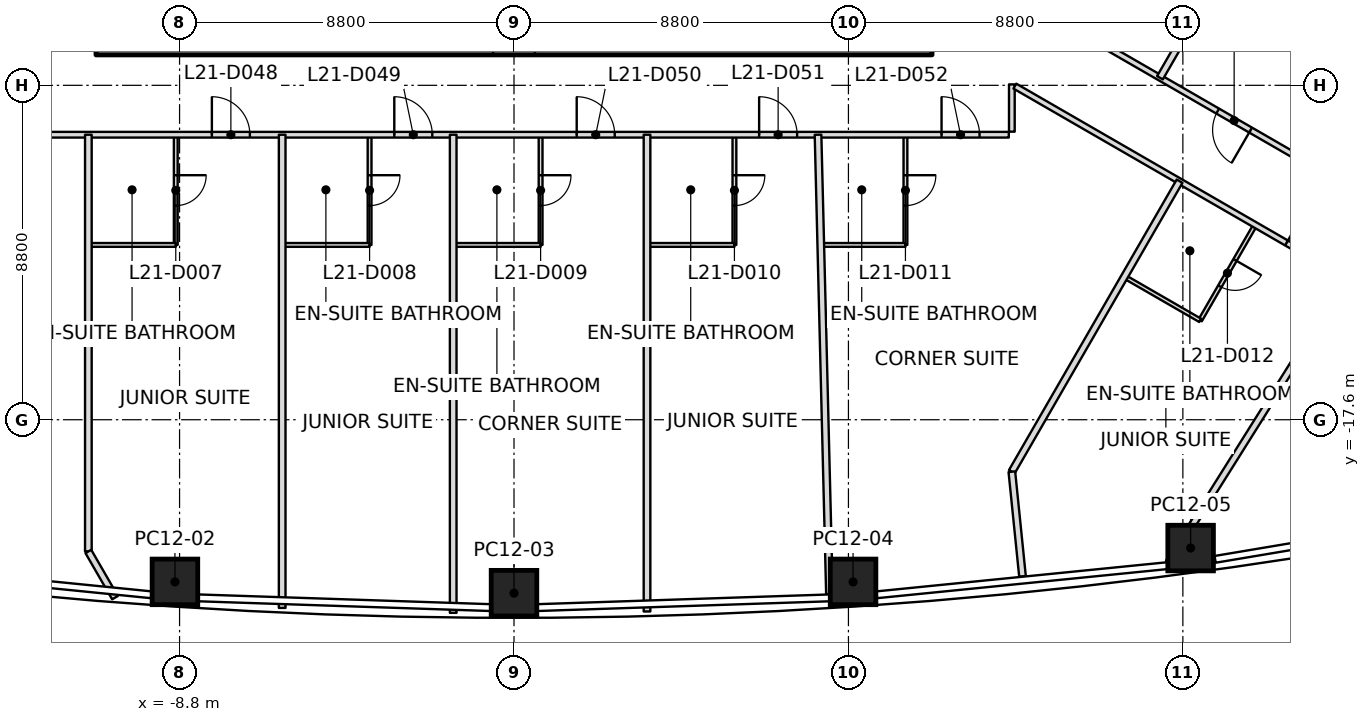
"""IFC4 building model, lengths in metres.
Left out: names, types, materials, properties, quantities, classifications, styles, units other than length and angle.
Written with IfcOpenShell. Run it as: python <this file> out.ifc"""

import sys

from ifc_helpers import new_model, si_unit, direction, frame, frame_2d, origin, origin_2d, place, context, subcontext, project, spatial, rectangle, extrude, element, fill, save


model = new_model("IFC4")
c1 = context("Model", 3, precision=1e-05, world=origin(), true_north=direction((0.0, 1.0)))
c2 = subcontext(c1, "Body", "Model", "MODEL_VIEW")
j1 = project(units=[si_unit("LENGTHUNIT", "METRE"), si_unit("PLANEANGLEUNIT", "RADIAN")], contexts=[c1])
p1 = place(None, origin())
s1 = spatial("IfcSite", under=j1, at=p1, CompositionType="ELEMENT")
p2 = place(p1, origin())
s2 = spatial("IfcBuilding", under=s1, at=p2, CompositionType="ELEMENT")
p3 = place(p2, frame((0.0, 0.0, 99.8)))
s3 = spatial("IfcBuildingStorey", under=s2, at=p3, CompositionType="ELEMENT", Elevation=99.8)
p4 = place(p3, frame((-8.922, -21.867, 0.0), z_axis=(0.009632635025, 0.012073782257, 0.999880710947), x_axis=(-0.997737791534, 0.066646321699, 0.008807221425)))
e1 = element("IfcColumn", 1, at=p4, inside=s3, PredefinedType="COLUMN", context=c2, shape_type="SweptSolid", body=[
    extrude(rectangle(XDim=1.2, YDim=1.2, at=origin_2d()), origin(), (0.0, 0.0, 1.0), 3.7),
])
p5 = place(p3, frame((0.0, -22.164, 0.0), z_axis=(0.0, 0.012338222751, 0.999923881233), x_axis=(1.0, 0.0, 0.0)))
e2 = element("IfcColumn", 2, at=p5, inside=s3, PredefinedType="COLUMN", context=c2, shape_type="SweptSolid", body=[
    extrude(rectangle(XDim=1.2, YDim=1.2, at=origin_2d()), origin(), (0.0, 0.0, 1.0), 3.7),
])
p6 = place(p3, frame((8.922, -21.867, 0.0), z_axis=(-0.009632635025, 0.012073782257, 0.999880710947), x_axis=(0.997737791534, 0.066646321699, 0.008807221425)))
e3 = element("IfcColumn", 3, at=p6, inside=s3, PredefinedType="COLUMN", context=c2, shape_type="SweptSolid", body=[
    extrude(rectangle(XDim=1.2, YDim=1.2, at=origin_2d()), origin(), (0.0, 0.0, 1.0), 3.7),
])
p7 = place(p3, frame((17.804, -20.977, 0.0), z_axis=(-0.019196808933, 0.011346567479, 0.99975133805), x_axis=(0.99096351093, 0.132982750018, 0.01751879569)))
e4 = element("IfcColumn", 4, at=p7, inside=s3, PredefinedType="COLUMN", context=c2, shape_type="SweptSolid", body=[
    extrude(rectangle(XDim=1.2, YDim=1.2, at=origin_2d()), origin(), (0.0, 0.0, 1.0), 3.701),
])
p8 = place(p3, frame((-11.0, -7.75, 0.0), z_axis=(0.0, 0.0, 1.0), x_axis=(1.0, 0.0, 0.0)))
e5 = element("IfcWall", 5, at=p8, inside=s3, PredefinedType="SHEAR", context=c2, shape_type="SweptSolid", body=[
    extrude(rectangle(XDim=22.0, YDim=0.5, at=frame_2d((11.0, 0.0))), origin(), (0.0, 0.0, 1.0), 3.7),
])
p9 = place(p8, frame((10.45, 0.0, 0.0)))
e6 = element("IfcOpeningElement", 6, at=p9, cuts=e5, PredefinedType="OPENING", context=c2, shape_type="SweptSolid", body=[
    extrude(rectangle(XDim=1.1, YDim=2.1, at=frame_2d((0.55, 1.05))), frame((0.0, 0.25, 0.0), z_axis=(0.0, -1.0, 0.0), x_axis=(1.0, 0.0, 0.0)), (0.0, 0.0, 1.0), 0.5),
])
p10 = place(p3, frame((-11.2, -10.1, 0.0), z_axis=(0.0, 0.0, 1.0), x_axis=(0.0, -1.0, 0.0)))
e7 = element("IfcWall", 7, at=p10, inside=s3, PredefinedType="PARTITIONING", context=c2, shape_type="SweptSolid", body=[
    extrude(rectangle(XDim=10.967, YDim=0.175, at=frame_2d((5.483, 0.0))), origin(), (0.0, 0.0, 1.0), 3.0),
])
p11 = place(p3, frame((-11.2, -21.067, 0.0), z_axis=(0.0, 0.0, 1.0), x_axis=(0.500068863623, -0.865985641702, 0.0)))
e8 = element("IfcWall", 8, at=p11, inside=s3, PredefinedType="PARTITIONING", context=c2, shape_type="SweptSolid", body=[
    extrude(rectangle(XDim=1.403, YDim=0.175, at=frame_2d((0.702, 0.0))), origin(), (0.0, 0.0, 1.0), 2.934),
])
p12 = place(p3, frame((-6.1, -10.1, 0.0), z_axis=(0.0, 0.0, 1.0), x_axis=(0.0, -1.0, 0.0)))
e9 = element("IfcWall", 9, at=p12, inside=s3, PredefinedType="PARTITIONING", context=c2, shape_type="SweptSolid", body=[
    extrude(rectangle(XDim=12.452, YDim=0.175, at=frame_2d((6.226, 0.0))), origin(), (0.0, 0.0, 1.0), 2.784),
])
p13 = place(p3, frame((-1.6, -10.1, 0.0), z_axis=(0.0, 0.0, 1.0), x_axis=(0.0, -1.0, 0.0)))
e10 = element("IfcWall", 10, at=p13, inside=s3, PredefinedType="PARTITIONING", context=c2, shape_type="SweptSolid", body=[
    extrude(rectangle(XDim=12.582, YDim=0.175, at=frame_2d((6.291, 0.0))), origin(), (0.0, 0.0, 1.0), 2.784),
])
p14 = place(p3, frame((3.5, -10.1, 0.0), z_axis=(0.0, 0.0, 1.0), x_axis=(0.0, -1.0, 0.0)))
e11 = element("IfcWall", 11, at=p14, inside=s3, PredefinedType="PARTITIONING", context=c2, shape_type="SweptSolid", body=[
    extrude(rectangle(XDim=12.546, YDim=0.175, at=frame_2d((6.273, 0.0))), origin(), (0.0, 0.0, 1.0), 2.784),
])
p15 = place(p3, frame((8.0, -10.1, 0.0), z_axis=(0.0, 0.0, 1.0), x_axis=(0.024895837943, -0.999690050592, 0.0)))
e12 = element("IfcWall", 12, at=p15, inside=s3, PredefinedType="PARTITIONING", context=c2, shape_type="SweptSolid", body=[
    extrude(rectangle(XDim=12.091, YDim=0.175, at=frame_2d((6.046, 0.0))), origin(), (0.0, 0.0, 1.0), 2.784),
])
p16 = place(p3, frame((17.513, -11.324, 0.0), z_axis=(0.0, 0.0, 1.0), x_axis=(-0.499982637805, -0.86603542762, 0.0)))
e13 = element("IfcWall", 13, at=p16, inside=s3, PredefinedType="PARTITIONING", context=c2, shape_type="SweptSolid", body=[
    extrude(rectangle(XDim=8.826, YDim=0.175, at=frame_2d((4.413, 0.0))), origin(), (0.0, 0.0, 1.0), 2.797),
])
p17 = place(p3, frame((13.1, -18.968, 0.0), z_axis=(0.0, 0.0, 1.0), x_axis=(0.101232273985, -0.994862818033, 0.0)))
e14 = element("IfcWall", 14, at=p17, inside=s3, PredefinedType="PARTITIONING", context=c2, shape_type="SweptSolid", body=[
    extrude(rectangle(XDim=2.769, YDim=0.175, at=frame_2d((1.384, 0.0))), origin(), (0.0, 0.0, 1.0), 2.784),
])
p18 = place(p3, frame((16.997, -8.601, 0.0), z_axis=(0.0, 0.0, 1.0), x_axis=(0.500004790049, 0.866022638231, 0.0)))
e15 = element("IfcWall", 15, at=p18, inside=s3, PredefinedType="PARTITIONING", context=c2, shape_type="SweptSolid", body=[
    extrude(rectangle(XDim=13.823, YDim=0.175, at=frame_2d((6.911, 0.0))), origin(), (0.0, 0.0, 1.0), 2.784),
])
p19 = place(p3, frame((21.93, -13.874, 0.0), z_axis=(0.0, 0.0, 1.0), x_axis=(-0.53194005048, -0.846782016044, 0.0)))
e16 = element("IfcWall", 16, at=p19, inside=s3, PredefinedType="PARTITIONING", context=c2, shape_type="SweptSolid", body=[
    extrude(rectangle(XDim=8.834, YDim=0.175, at=frame_2d((4.417, 0.0))), origin(), (0.0, 0.0, 1.0), 3.0),
])
p20 = place(p3, frame((-13.02, -10.1, 0.0), z_axis=(0.0, 0.0, 1.0), x_axis=(1.0, 0.0, 0.0)))
e17 = element("IfcWall", 17, at=p20, inside=s3, PredefinedType="PARTITIONING", context=c2, shape_type="SweptSolid", body=[
    extrude(rectangle(XDim=26.04, YDim=0.15, at=frame_2d((13.02, 0.0))), origin(), (0.0, 0.0, 1.0), 2.867),
])
p21 = place(p20, frame((5.07, 0.0, 0.0)))
e18 = element("IfcOpeningElement", 18, at=p21, cuts=e17, PredefinedType="OPENING", context=c2, shape_type="SweptSolid", body=[
    extrude(rectangle(XDim=1.0, YDim=2.1, at=frame_2d((0.5, 1.05))), frame((0.0, 0.075, 0.0), z_axis=(0.0, -1.0, 0.0), x_axis=(1.0, 0.0, 0.0)), (0.0, 0.0, 1.0), 0.15),
])
p22 = place(p20, frame((9.87, 0.0, 0.0)))
e19 = element("IfcOpeningElement", 19, at=p22, cuts=e17, PredefinedType="OPENING", context=c2, shape_type="SweptSolid", body=[
    extrude(rectangle(XDim=1.0, YDim=2.1, at=frame_2d((0.5, 1.05))), frame((0.0, 0.075, 0.0), z_axis=(0.0, -1.0, 0.0), x_axis=(1.0, 0.0, 0.0)), (0.0, 0.0, 1.0), 0.15),
])
p23 = place(p20, frame((14.67, 0.0, 0.0)))
e20 = element("IfcOpeningElement", 20, at=p23, cuts=e17, PredefinedType="OPENING", context=c2, shape_type="SweptSolid", body=[
    extrude(rectangle(XDim=1.0, YDim=2.1, at=frame_2d((0.5, 1.05))), frame((0.0, 0.075, 0.0), z_axis=(0.0, -1.0, 0.0), x_axis=(1.0, 0.0, 0.0)), (0.0, 0.0, 1.0), 0.15),
])
p24 = place(p20, frame((19.47, 0.0, 0.0)))
e21 = element("IfcOpeningElement", 21, at=p24, cuts=e17, PredefinedType="OPENING", context=c2, shape_type="SweptSolid", body=[
    extrude(rectangle(XDim=1.0, YDim=2.1, at=frame_2d((0.5, 1.05))), frame((0.0, 0.075, 0.0), z_axis=(0.0, -1.0, 0.0), x_axis=(1.0, 0.0, 0.0)), (0.0, 0.0, 1.0), 0.15),
])
p25 = place(p20, frame((24.27, 0.0, 0.0)))
e22 = element("IfcOpeningElement", 22, at=p25, cuts=e17, PredefinedType="OPENING", context=c2, shape_type="SweptSolid", body=[
    extrude(rectangle(XDim=1.0, YDim=2.1, at=frame_2d((0.5, 1.05))), frame((0.0, 0.075, 0.0), z_axis=(0.0, -1.0, 0.0), x_axis=(1.0, 0.0, 0.0)), (0.0, 0.0, 1.0), 0.15),
])
p26 = place(p3, frame((13.1, -10.02, 0.0), z_axis=(0.0, 0.0, 1.0), x_axis=(0.0, 1.0, 0.0)))
e23 = element("IfcWall", 23, at=p26, inside=s3, PredefinedType="PARTITIONING", context=c2, shape_type="SweptSolid", body=[
    extrude(rectangle(XDim=1.244, YDim=0.15, at=frame_2d((0.622, 0.0))), origin(), (0.0, 0.0, 1.0), 2.797),
])
p27 = place(p3, frame((13.179, -8.822, 0.0), z_axis=(0.0, 0.0, 1.0), x_axis=(0.866025385035, -0.500000032475, 0.0)))
e24 = element("IfcWall", 24, at=p27, inside=s3, PredefinedType="PARTITIONING", context=c2, shape_type="SweptSolid", body=[
    extrude(rectangle(XDim=10.024, YDim=0.15, at=frame_2d((5.012, 0.0))), origin(), (0.0, 0.0, 1.0), 2.797),
])
p28 = place(p27, frame((8.254, 0.0, 0.0)))
e25 = element("IfcOpeningElement", 25, at=p28, cuts=e24, PredefinedType="OPENING", context=c2, shape_type="SweptSolid", body=[
    extrude(rectangle(XDim=1.0, YDim=2.1, at=frame_2d((0.5, 1.05))), frame((0.0, 0.075, 0.0), z_axis=(0.0, -1.0, 0.0), x_axis=(1.0, 0.0, 0.0)), (0.0, 0.0, 1.0), 0.15),
])
p29 = place(p3, frame((22.911, -12.015, 0.0), z_axis=(0.0, 0.0, 1.0), x_axis=(-0.866018341403, 0.500012232204, 0.0)))
e26 = element("IfcWall", 26, at=p29, inside=s3, PredefinedType="PARTITIONING", context=c2, shape_type="SweptSolid", body=[
    extrude(rectangle(XDim=11.328, YDim=0.15, at=frame_2d((5.664, 0.0))), origin(), (0.0, 0.0, 1.0), 2.797),
])
p30 = place(p29, frame((4.074, 0.0, 0.0)))
e27 = element("IfcOpeningElement", 27, at=p30, cuts=e26, PredefinedType="OPENING", context=c2, shape_type="SweptSolid", body=[
    extrude(rectangle(XDim=1.0, YDim=2.1, at=frame_2d((0.5, 1.05))), frame((0.0, 0.075, 0.0), z_axis=(0.0, -1.0, 0.0), x_axis=(1.0, 0.0, 0.0)), (0.0, 0.0, 1.0), 0.15),
])
p31 = place(p3, frame((-8.9, -10.13, 0.0), z_axis=(0.0, 0.0, 1.0), x_axis=(0.0, -1.0, 0.0)))
e28 = element("IfcWall", 28, at=p31, inside=s3, PredefinedType="PARTITIONING", context=c2, shape_type="SweptSolid", body=[
    extrude(rectangle(XDim=2.87, YDim=0.1, at=frame_2d((1.435, 0.0))), origin(), (0.0, 0.0, 1.0), 3.0),
])
p32 = place(p31, frame((1.035, 0.0, 0.0)))
e29 = element("IfcOpeningElement", 29, at=p32, cuts=e28, PredefinedType="OPENING", context=c2, shape_type="SweptSolid", body=[
    extrude(rectangle(XDim=0.8, YDim=2.1, at=frame_2d((0.4, 1.05))), frame((0.0, 0.05, 0.0), z_axis=(0.0, -1.0, 0.0), x_axis=(1.0, 0.0, 0.0)), (0.0, 0.0, 1.0), 0.1),
])
p33 = place(p3, frame((-8.9, -13.0, 0.0), z_axis=(0.0, 0.0, 1.0), x_axis=(-1.0, 0.0, 0.0)))
e30 = element("IfcWall", 30, at=p33, inside=s3, PredefinedType="PARTITIONING", context=c2, shape_type="SweptSolid", body=[
    extrude(rectangle(XDim=2.27, YDim=0.1, at=frame_2d((1.135, 0.0))), origin(), (0.0, 0.0, 1.0), 3.0),
])
p34 = place(p3, frame((-3.8, -10.13, 0.0), z_axis=(0.0, 0.0, 1.0), x_axis=(0.0, -1.0, 0.0)))
e31 = element("IfcWall", 31, at=p34, inside=s3, PredefinedType="PARTITIONING", context=c2, shape_type="SweptSolid", body=[
    extrude(rectangle(XDim=2.87, YDim=0.1, at=frame_2d((1.435, 0.0))), origin(), (0.0, 0.0, 1.0), 3.0),
])
p35 = place(p34, frame((1.035, 0.0, 0.0)))
e32 = element("IfcOpeningElement", 32, at=p35, cuts=e31, PredefinedType="OPENING", context=c2, shape_type="SweptSolid", body=[
    extrude(rectangle(XDim=0.8, YDim=2.1, at=frame_2d((0.4, 1.05))), frame((0.0, 0.05, 0.0), z_axis=(0.0, -1.0, 0.0), x_axis=(1.0, 0.0, 0.0)), (0.0, 0.0, 1.0), 0.1),
])
p36 = place(p3, frame((-3.8, -13.0, 0.0), z_axis=(0.0, 0.0, 1.0), x_axis=(-1.0, 0.0, 0.0)))
e33 = element("IfcWall", 33, at=p36, inside=s3, PredefinedType="PARTITIONING", context=c2, shape_type="SweptSolid", body=[
    extrude(rectangle(XDim=2.27, YDim=0.1, at=frame_2d((1.135, 0.0))), origin(), (0.0, 0.0, 1.0), 3.0),
])
p37 = place(p3, frame((0.7, -10.13, 0.0), z_axis=(0.0, 0.0, 1.0), x_axis=(0.0, -1.0, 0.0)))
e34 = element("IfcWall", 34, at=p37, inside=s3, PredefinedType="PARTITIONING", context=c2, shape_type="SweptSolid", body=[
    extrude(rectangle(XDim=2.87, YDim=0.1, at=frame_2d((1.435, 0.0))), origin(), (0.0, 0.0, 1.0), 3.0),
])
p38 = place(p37, frame((1.035, 0.0, 0.0)))
e35 = element("IfcOpeningElement", 35, at=p38, cuts=e34, PredefinedType="OPENING", context=c2, shape_type="SweptSolid", body=[
    extrude(rectangle(XDim=0.8, YDim=2.1, at=frame_2d((0.4, 1.05))), frame((0.0, 0.05, 0.0), z_axis=(0.0, -1.0, 0.0), x_axis=(1.0, 0.0, 0.0)), (0.0, 0.0, 1.0), 0.1),
])
p39 = place(p3, frame((0.7, -13.0, 0.0), z_axis=(0.0, 0.0, 1.0), x_axis=(-1.0, 0.0, 0.0)))
e36 = element("IfcWall", 36, at=p39, inside=s3, PredefinedType="PARTITIONING", context=c2, shape_type="SweptSolid", body=[
    extrude(rectangle(XDim=2.27, YDim=0.1, at=frame_2d((1.135, 0.0))), origin(), (0.0, 0.0, 1.0), 2.867),
])
p40 = place(p3, frame((5.8, -10.13, 0.0), z_axis=(0.0, 0.0, 1.0), x_axis=(0.0, -1.0, 0.0)))
e37 = element("IfcWall", 37, at=p40, inside=s3, PredefinedType="PARTITIONING", context=c2, shape_type="SweptSolid", body=[
    extrude(rectangle(XDim=2.87, YDim=0.1, at=frame_2d((1.435, 0.0))), origin(), (0.0, 0.0, 1.0), 3.0),
])
p41 = place(p40, frame((1.035, 0.0, 0.0)))
e38 = element("IfcOpeningElement", 38, at=p41, cuts=e37, PredefinedType="OPENING", context=c2, shape_type="SweptSolid", body=[
    extrude(rectangle(XDim=0.8, YDim=2.1, at=frame_2d((0.4, 1.05))), frame((0.0, 0.05, 0.0), z_axis=(0.0, -1.0, 0.0), x_axis=(1.0, 0.0, 0.0)), (0.0, 0.0, 1.0), 0.1),
])
p42 = place(p3, frame((5.8, -13.0, 0.0), z_axis=(0.0, 0.0, 1.0), x_axis=(-1.0, 0.0, 0.0)))
e39 = element("IfcWall", 39, at=p42, inside=s3, PredefinedType="PARTITIONING", context=c2, shape_type="SweptSolid", body=[
    extrude(rectangle(XDim=2.27, YDim=0.1, at=frame_2d((1.135, 0.0))), origin(), (0.0, 0.0, 1.0), 2.867),
])
p43 = place(p3, frame((10.3, -10.13, 0.0), z_axis=(0.0, 0.0, 1.0), x_axis=(0.0, -1.0, 0.0)))
e40 = element("IfcWall", 40, at=p43, inside=s3, PredefinedType="PARTITIONING", context=c2, shape_type="SweptSolid", body=[
    extrude(rectangle(XDim=2.87, YDim=0.1, at=frame_2d((1.435, 0.0))), origin(), (0.0, 0.0, 1.0), 3.0),
])
p44 = place(p43, frame((1.035, 0.0, 0.0)))
e41 = element("IfcOpeningElement", 41, at=p44, cuts=e40, PredefinedType="OPENING", context=c2, shape_type="SweptSolid", body=[
    extrude(rectangle(XDim=0.8, YDim=2.1, at=frame_2d((0.4, 1.05))), frame((0.0, 0.05, 0.0), z_axis=(0.0, -1.0, 0.0), x_axis=(1.0, 0.0, 0.0)), (0.0, 0.0, 1.0), 0.1),
])
p45 = place(p3, frame((10.3, -13.0, 0.0), z_axis=(0.0, 0.0, 1.0), x_axis=(-1.0, 0.0, 0.0)))
e42 = element("IfcWall", 42, at=p45, inside=s3, PredefinedType="PARTITIONING", context=c2, shape_type="SweptSolid", body=[
    extrude(rectangle(XDim=2.27, YDim=0.1, at=frame_2d((1.135, 0.0))), origin(), (0.0, 0.0, 1.0), 3.0),
])
p46 = place(p3, frame((19.49, -12.5, 0.0), z_axis=(0.0, 0.0, 1.0), x_axis=(-0.499972835562, -0.866041086612, 0.0)))
e43 = element("IfcWall", 43, at=p46, inside=s3, PredefinedType="PARTITIONING", context=c2, shape_type="SweptSolid", body=[
    extrude(rectangle(XDim=2.87, YDim=0.1, at=frame_2d((1.435, 0.0))), origin(), (0.0, 0.0, 1.0), 3.0),
])
p47 = place(p46, frame((1.035, 0.0, 0.0)))
e44 = element("IfcOpeningElement", 44, at=p47, cuts=e43, PredefinedType="OPENING", context=c2, shape_type="SweptSolid", body=[
    extrude(rectangle(XDim=0.8, YDim=2.1, at=frame_2d((0.4, 1.05))), frame((0.0, 0.05, 0.0), z_axis=(0.0, -1.0, 0.0), x_axis=(1.0, 0.0, 0.0)), (0.0, 0.0, 1.0), 0.1),
])
p48 = place(p3, frame((18.055, -14.985, 0.0), z_axis=(0.0, 0.0, 1.0), x_axis=(-0.866044110172, 0.499967598186, 0.0)))
e45 = element("IfcWall", 45, at=p48, inside=s3, PredefinedType="PARTITIONING", context=c2, shape_type="SweptSolid", body=[
    extrude(rectangle(XDim=2.27, YDim=0.1, at=frame_2d((1.135, 0.0))), origin(), (0.0, 0.0, 1.0), 3.0),
])
p49 = place(p21, origin())
e46 = element("IfcDoor", 46, at=p49, inside=s3, OperationType="SINGLE_SWING_LEFT", PredefinedType="DOOR", context=c2, shape_type="SweptSolid", body=[
    extrude(rectangle(XDim=1.0, YDim=2.1, at=frame_2d((0.5, 1.05))), frame((0.0, 0.025, 0.0), z_axis=(0.0, -1.0, 0.0), x_axis=(1.0, 0.0, 0.0)), (0.0, 0.0, 1.0), 0.05),
])
fill(e18, e46)
p50 = place(p32, origin())
e47 = element("IfcDoor", 47, at=p50, inside=s3, OperationType="SINGLE_SWING_RIGHT", PredefinedType="DOOR", context=c2, shape_type="SweptSolid", body=[
    extrude(rectangle(XDim=0.8, YDim=2.1, at=frame_2d((0.4, 1.05))), frame((0.0, 0.025, 0.0), z_axis=(0.0, -1.0, 0.0), x_axis=(1.0, 0.0, 0.0)), (0.0, 0.0, 1.0), 0.05),
])
fill(e29, e47)
p51 = place(p22, origin())
e48 = element("IfcDoor", 48, at=p51, inside=s3, OperationType="SINGLE_SWING_LEFT", PredefinedType="DOOR", context=c2, shape_type="SweptSolid", body=[
    extrude(rectangle(XDim=1.0, YDim=2.1, at=frame_2d((0.5, 1.05))), frame((0.0, 0.025, 0.0), z_axis=(0.0, -1.0, 0.0), x_axis=(1.0, 0.0, 0.0)), (0.0, 0.0, 1.0), 0.05),
])
fill(e19, e48)
p52 = place(p35, origin())
e49 = element("IfcDoor", 49, at=p52, inside=s3, OperationType="SINGLE_SWING_LEFT", PredefinedType="DOOR", context=c2, shape_type="SweptSolid", body=[
    extrude(rectangle(XDim=0.8, YDim=2.1, at=frame_2d((0.4, 1.05))), frame((0.0, 0.025, 0.0), z_axis=(0.0, -1.0, 0.0), x_axis=(1.0, 0.0, 0.0)), (0.0, 0.0, 1.0), 0.05),
])
fill(e32, e49)
p53 = place(p23, origin())
e50 = element("IfcDoor", 50, at=p53, inside=s3, OperationType="SINGLE_SWING_LEFT", PredefinedType="DOOR", context=c2, shape_type="SweptSolid", body=[
    extrude(rectangle(XDim=1.0, YDim=2.1, at=frame_2d((0.5, 1.05))), frame((0.0, 0.025, 0.0), z_axis=(0.0, -1.0, 0.0), x_axis=(1.0, 0.0, 0.0)), (0.0, 0.0, 1.0), 0.05),
])
fill(e20, e50)
p54 = place(p38, origin())
e51 = element("IfcDoor", 51, at=p54, inside=s3, OperationType="SINGLE_SWING_LEFT", PredefinedType="DOOR", context=c2, shape_type="SweptSolid", body=[
    extrude(rectangle(XDim=0.8, YDim=2.1, at=frame_2d((0.4, 1.05))), frame((0.0, 0.025, 0.0), z_axis=(0.0, -1.0, 0.0), x_axis=(1.0, 0.0, 0.0)), (0.0, 0.0, 1.0), 0.05),
])
fill(e35, e51)
p55 = place(p24, origin())
e52 = element("IfcDoor", 52, at=p55, inside=s3, OperationType="SINGLE_SWING_LEFT", PredefinedType="DOOR", context=c2, shape_type="SweptSolid", body=[
    extrude(rectangle(XDim=1.0, YDim=2.1, at=frame_2d((0.5, 1.05))), frame((0.0, 0.025, 0.0), z_axis=(0.0, -1.0, 0.0), x_axis=(1.0, 0.0, 0.0)), (0.0, 0.0, 1.0), 0.05),
])
fill(e21, e52)
p56 = place(p41, origin())
e53 = element("IfcDoor", 53, at=p56, inside=s3, OperationType="SINGLE_SWING_LEFT", PredefinedType="DOOR", context=c2, shape_type="SweptSolid", body=[
    extrude(rectangle(XDim=0.8, YDim=2.1, at=frame_2d((0.4, 1.05))), frame((0.0, 0.025, 0.0), z_axis=(0.0, -1.0, 0.0), x_axis=(1.0, 0.0, 0.0)), (0.0, 0.0, 1.0), 0.05),
])
fill(e38, e53)
p57 = place(p25, origin())
e54 = element("IfcDoor", 54, at=p57, inside=s3, OperationType="SINGLE_SWING_RIGHT", PredefinedType="DOOR", context=c2, shape_type="SweptSolid", body=[
    extrude(rectangle(XDim=1.0, YDim=2.1, at=frame_2d((0.5, 1.05))), frame((0.0, 0.025, 0.0), z_axis=(0.0, -1.0, 0.0), x_axis=(1.0, 0.0, 0.0)), (0.0, 0.0, 1.0), 0.05),
])
fill(e22, e54)
p58 = place(p44, origin())
e55 = element("IfcDoor", 55, at=p58, inside=s3, OperationType="SINGLE_SWING_RIGHT", PredefinedType="DOOR", context=c2, shape_type="SweptSolid", body=[
    extrude(rectangle(XDim=0.8, YDim=2.1, at=frame_2d((0.4, 1.05))), frame((0.0, 0.025, 0.0), z_axis=(0.0, -1.0, 0.0), x_axis=(1.0, 0.0, 0.0)), (0.0, 0.0, 1.0), 0.05),
])
fill(e41, e55)
p59 = place(p28, origin())
e56 = element("IfcDoor", 56, at=p59, inside=s3, OperationType="SINGLE_SWING_LEFT", PredefinedType="DOOR", context=c2, shape_type="SweptSolid", body=[
    extrude(rectangle(XDim=1.0, YDim=2.1, at=frame_2d((0.5, 1.05))), frame((0.0, 0.025, 0.0), z_axis=(0.0, -1.0, 0.0), x_axis=(1.0, 0.0, 0.0)), (0.0, 0.0, 1.0), 0.05),
])
fill(e25, e56)
p60 = place(p47, origin())
e57 = element("IfcDoor", 57, at=p60, inside=s3, OperationType="SINGLE_SWING_LEFT", PredefinedType="DOOR", context=c2, shape_type="SweptSolid", body=[
    extrude(rectangle(XDim=0.8, YDim=2.1, at=frame_2d((0.4, 1.05))), frame((0.0, 0.025, 0.0), z_axis=(0.0, -1.0, 0.0), x_axis=(1.0, 0.0, 0.0)), (0.0, 0.0, 1.0), 0.05),
])
fill(e44, e57)
p61 = place(p30, origin())
e58 = element("IfcDoor", 58, at=p61, inside=s3, OperationType="SINGLE_SWING_LEFT", PredefinedType="DOOR", context=c2, shape_type="SweptSolid", body=[
    extrude(rectangle(XDim=1.0, YDim=2.1, at=frame_2d((0.5, 1.05))), frame((0.0, 0.025, 0.0), z_axis=(0.0, -1.0, 0.0), x_axis=(1.0, 0.0, 0.0)), (0.0, 0.0, 1.0), 0.05),
])
fill(e27, e58)
save(model, sys.argv[1])
